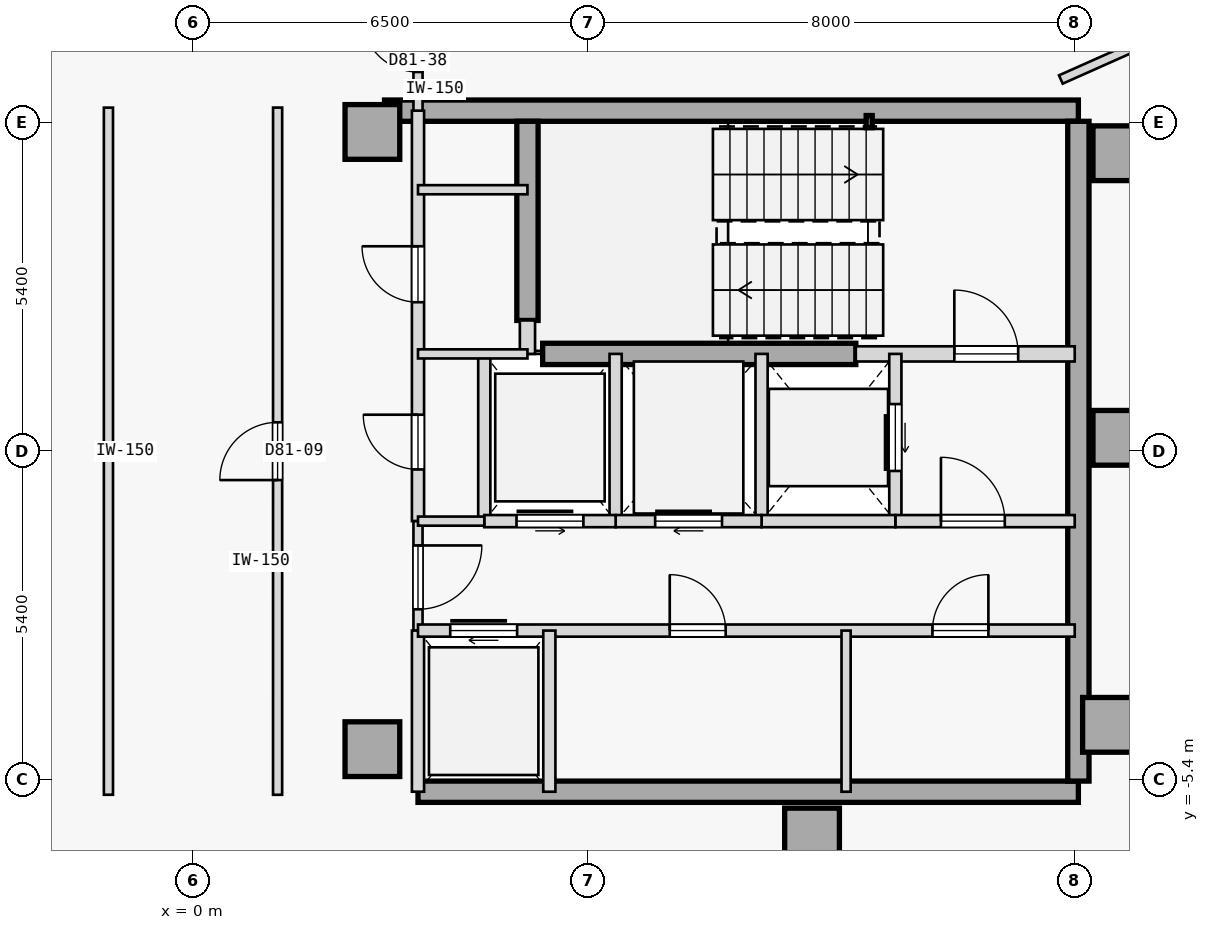
"""IFC4 building model, lengths in metres.
Left out: names, types, materials, properties, quantities, classifications, styles, units other than length and angle.
Written with IfcOpenShell. Run it as: python <this file> out.ifc"""

import sys

from ifc_helpers import new_model, si_unit, direction, frame, frame_2d, origin, origin_2d, place, context, subcontext, project, spatial, rectangle, hollow_rectangle, extrude, element, fill, save


model = new_model("IFC4")
c1 = context("Model", 3, precision=1e-05, world=origin(), true_north=direction((0.0, 1.0)))
c2 = subcontext(c1, "Body", "Model", "MODEL_VIEW")
j1 = project(units=[si_unit("LENGTHUNIT", "METRE"), si_unit("PLANEANGLEUNIT", "RADIAN")], contexts=[c1])
p1 = place(None, origin())
s1 = spatial("IfcSite", under=j1, at=p1, CompositionType="ELEMENT")
p2 = place(p1, origin())
s2 = spatial("IfcBuilding", under=s1, at=p2, CompositionType="ELEMENT")
p3 = place(p2, frame((0.0, 0.0, 302.0)))
s3 = spatial("IfcBuildingStorey", under=s2, at=p3, CompositionType="ELEMENT", Elevation=302.0)
for number, where, z_axis, x_axis in (
    (1, (15.25, 4.9, 0.0), (0.0, 0.0, 1.0), (1.0, 0.0, 0.0)),
    (2, (15.25, 0.22, 0.0), (0.0, 0.0, 1.0), (1.0, 0.0, 0.0)),
    (3, (15.08, -4.5, 0.0), (0.0, 0.0, 1.0), (1.0, 0.0, 0.0)),
    (4, (10.18, -6.32, 0.0), (0.0, 0.0, 1.0), (1.0, 0.0, 0.0)),
    (5, (2.95, -4.9, 0.0), (0.0, 0.0, 1.0), (1.0, 0.0, 0.0)),
    (6, (2.95, 5.25, 0.0), (0.0, 0.0, 1.0), (1.0, 0.0, 0.0)),
):
    element("IfcColumn", number, at=place(p3, frame(where, z_axis=z_axis, x_axis=x_axis)), inside=s3, PredefinedType="COLUMN", context=c2, shape_type="SweptSolid", body=[
        extrude(rectangle(XDim=0.9, YDim=0.9, at=origin_2d()), origin(), (0.0, 0.0, 1.0), 3.55),
    ])
p4 = place(p3, frame((3.15, 5.6, 0.0), z_axis=(0.0, 0.0, 1.0), x_axis=(1.0, 0.0, 0.0)))
e7 = element("IfcWall", 7, at=p4, inside=s3, PredefinedType="SHEAR", context=c2, shape_type="SweptSolid", body=[
    extrude(rectangle(XDim=11.41, YDim=0.35, at=frame_2d((5.705, 0.0))), origin(), (0.0, 0.0, 1.0), 3.145),
])
p5 = place(p3, frame((3.7, -5.6, 0.0), z_axis=(0.0, 0.0, 1.0), x_axis=(1.0, 0.0, 0.0)))
e8 = element("IfcWall", 8, at=p5, inside=s3, PredefinedType="SHEAR", context=c2, shape_type="SweptSolid", body=[
    extrude(rectangle(XDim=10.86, YDim=0.35, at=frame_2d((5.43, 0.0))), origin(), (0.0, 0.0, 1.0), 3.145),
])
p6 = place(p3, frame((14.56, -5.425, 0.0), z_axis=(0.0, 0.0, 1.0), x_axis=(0.0, 1.0, 0.0)))
e9 = element("IfcWall", 9, at=p6, inside=s3, PredefinedType="SHEAR", context=c2, shape_type="SweptSolid", body=[
    extrude(rectangle(XDim=10.85, YDim=0.35, at=frame_2d((5.425, 0.0))), origin(), (0.0, 0.0, 1.0), 3.145),
])
p7 = place(p3, frame((5.5, 2.15, 0.0), z_axis=(0.0, 0.0, 1.0), x_axis=(0.0, 1.0, 0.0)))
e10 = element("IfcWall", 10, at=p7, inside=s3, PredefinedType="SHEAR", context=c2, shape_type="SweptSolid", body=[
    extrude(rectangle(XDim=3.275, YDim=0.35, at=frame_2d((1.638, 0.0))), origin(), (0.0, 0.0, 1.0), 3.145),
])
p8 = place(p3, frame((5.75, 1.6, 0.0), z_axis=(0.0, 0.0, 1.0), x_axis=(1.0, 0.0, 0.0)))
e11 = element("IfcWall", 11, at=p8, inside=s3, PredefinedType="SHEAR", context=c2, shape_type="SweptSolid", body=[
    extrude(rectangle(XDim=5.15, YDim=0.35, at=frame_2d((2.575, 0.0))), origin(), (0.0, 0.0, 1.0), 3.145),
])
p9 = place(p3, frame((11.12, 5.42, 0.0), z_axis=(0.0, 0.0, 1.0), x_axis=(1.0, 0.0, 0.0)))
e12 = element("IfcColumn", 12, at=p9, inside=s3, PredefinedType="COLUMN", context=c2, shape_type="SweptSolid", body=[
    extrude(hollow_rectangle(XDim=0.1, YDim=0.2, WallThickness=0.008, at=origin_2d()), origin(), (0.0, 0.0, 1.0), 3.55),
])
p10 = place(p3, frame((10.9, 1.6, 0.0), z_axis=(0.0, 0.0, 1.0), x_axis=(1.0, 0.0, 0.0)))
e13 = element("IfcWall", 13, at=p10, inside=s3, PredefinedType="STANDARD", context=c2, shape_type="SweptSolid", body=[
    extrude(rectangle(XDim=3.6, YDim=0.25, at=frame_2d((1.8, 0.0))), origin(), (0.0, 0.0, 1.0), 3.145),
])
p11 = place(p10, frame((1.62, 0.0, 0.0)))
e14 = element("IfcOpeningElement", 14, at=p11, cuts=e13, PredefinedType="OPENING", context=c2, shape_type="SweptSolid", body=[
    extrude(rectangle(XDim=1.05, YDim=2.15, at=frame_2d((0.525, 1.075))), frame((0.0, 0.135, 0.0), z_axis=(0.0, -1.0, 0.0), x_axis=(1.0, 0.0, 0.0)), (0.0, 0.0, 1.0), 0.27),
])
p12 = place(p3, frame((5.5, 1.6, 0.0), z_axis=(0.0, 0.0, 1.0), x_axis=(0.0, 1.0, 0.0)))
e15 = element("IfcWall", 15, at=p12, inside=s3, PredefinedType="STANDARD", context=c2, shape_type="SweptSolid", body=[
    extrude(rectangle(XDim=0.55, YDim=0.25, at=frame_2d((0.275, 0.0))), origin(), (0.0, 0.0, 1.0), 3.145),
])
p13 = place(p3, frame((3.7, -1.15, 0.0), z_axis=(0.0, 0.0, 1.0), x_axis=(0.0, 1.0, 0.0)))
e16 = element("IfcWall", 16, at=p13, inside=s3, PredefinedType="STANDARD", context=c2, shape_type="SweptSolid", body=[
    extrude(rectangle(XDim=6.75, YDim=0.2, at=frame_2d((3.375, 0.0))), origin(), (0.0, 0.0, 1.0), 3.145),
])
p14 = place(p13, frame((3.6, 0.0, 0.0)))
e17 = element("IfcOpeningElement", 17, at=p14, cuts=e16, PredefinedType="OPENING", context=c2, shape_type="SweptSolid", body=[
    extrude(rectangle(XDim=0.92, YDim=2.04, at=frame_2d((0.46, 1.02))), frame((0.0, 0.11, 0.0), z_axis=(0.0, -1.0, 0.0), x_axis=(1.0, 0.0, 0.0)), (0.0, 0.0, 1.0), 0.22),
])
p15 = place(p13, frame((0.85, 0.0, 0.0)))
e18 = element("IfcOpeningElement", 18, at=p15, cuts=e16, PredefinedType="OPENING", context=c2, shape_type="SweptSolid", body=[
    extrude(rectangle(XDim=0.9, YDim=2.04, at=frame_2d((0.45, 1.02))), frame((0.0, 0.11, 0.0), z_axis=(0.0, -1.0, 0.0), x_axis=(1.0, 0.0, 0.0)), (0.0, 0.0, 1.0), 0.22),
])
p16 = place(p3, frame((3.7, -2.95, 0.0), z_axis=(0.0, 0.0, 1.0), x_axis=(0.0, 1.0, 0.0)))
e19 = element("IfcWall", 19, at=p16, inside=s3, PredefinedType="PARTITIONING", context=c2, shape_type="SweptSolid", body=[
    extrude(rectangle(XDim=1.8, YDim=0.15, at=frame_2d((0.9, 0.0))), origin(), (0.0, 0.0, 1.0), 3.145),
])
p17 = place(p16, frame((0.35, 0.0, 0.0)))
e20 = element("IfcOpeningElement", 20, at=p17, cuts=e19, PredefinedType="OPENING", context=c2, shape_type="SweptSolid", body=[
    extrude(rectangle(XDim=1.05, YDim=2.18, at=frame_2d((0.525, 1.09))), frame((0.0, 0.085, 0.0), z_axis=(0.0, -1.0, 0.0), x_axis=(1.0, 0.0, 0.0)), (0.0, 0.0, 1.0), 0.17),
])
p18 = place(p3, frame((3.7, -5.6, 0.0), z_axis=(0.0, 0.0, 1.0), x_axis=(0.0, 1.0, 0.0)))
e21 = element("IfcWall", 21, at=p18, inside=s3, PredefinedType="STANDARD", context=c2, shape_type="SweptSolid", body=[
    extrude(rectangle(XDim=2.65, YDim=0.2, at=frame_2d((1.325, 0.0))), origin(), (0.0, 0.0, 1.0), 3.145),
])
p19 = place(p3, frame((11.55, -1.15, 0.0), z_axis=(0.0, 0.0, 1.0), x_axis=(0.0, 1.0, 0.0)))
e22 = element("IfcWall", 22, at=p19, inside=s3, PredefinedType="STANDARD", context=c2, shape_type="SweptSolid", body=[
    extrude(rectangle(XDim=2.75, YDim=0.2, at=frame_2d((1.375, 0.0))), origin(), (0.0, 0.0, 1.0), 3.145),
])
p20 = place(p19, frame((0.825, 0.0, 0.0)))
e23 = element("IfcOpeningElement", 23, at=p20, cuts=e22, PredefinedType="OPENING", context=c2, shape_type="SweptSolid", body=[
    extrude(rectangle(XDim=1.1, YDim=2.15, at=frame_2d((0.55, 1.075))), frame((0.0, 0.11, 0.0), z_axis=(0.0, -1.0, 0.0), x_axis=(1.0, 0.0, 0.0)), (0.0, 0.0, 1.0), 0.22),
])
p21 = place(p3, frame((9.35, -1.15, 0.0), z_axis=(0.0, 0.0, 1.0), x_axis=(0.0, 1.0, 0.0)))
e24 = element("IfcWall", 24, at=p21, inside=s3, PredefinedType="STANDARD", context=c2, shape_type="SweptSolid", body=[
    extrude(rectangle(XDim=2.75, YDim=0.2, at=frame_2d((1.375, 0.0))), origin(), (0.0, 0.0, 1.0), 3.145),
])
p22 = place(p3, frame((11.55, -1.15, 0.0), z_axis=(0.0, 0.0, 1.0), x_axis=(1.0, 0.0, 0.0)))
e25 = element("IfcWall", 25, at=p22, inside=s3, PredefinedType="STANDARD", context=c2, shape_type="SweptSolid", body=[
    extrude(rectangle(XDim=2.95, YDim=0.2, at=frame_2d((1.475, 0.0))), origin(), (0.0, 0.0, 1.0), 3.145),
])
p23 = place(p22, frame((0.75, 0.0, 0.0)))
e26 = element("IfcOpeningElement", 26, at=p23, cuts=e25, PredefinedType="OPENING", context=c2, shape_type="SweptSolid", body=[
    extrude(rectangle(XDim=1.05, YDim=2.18, at=frame_2d((0.525, 1.09))), frame((0.0, 0.11, 0.0), z_axis=(0.0, -1.0, 0.0), x_axis=(1.0, 0.0, 0.0)), (0.0, 0.0, 1.0), 0.22),
])
p24 = place(p3, frame((9.35, -1.15, 0.0), z_axis=(0.0, 0.0, 1.0), x_axis=(1.0, 0.0, 0.0)))
e27 = element("IfcWall", 27, at=p24, inside=s3, PredefinedType="STANDARD", context=c2, shape_type="SweptSolid", body=[
    extrude(rectangle(XDim=2.2, YDim=0.2, at=frame_2d((1.1, 0.0))), origin(), (0.0, 0.0, 1.0), 3.145),
])
p25 = place(p3, frame((6.95, -1.15, 0.0), z_axis=(0.0, 0.0, 1.0), x_axis=(0.0, 1.0, 0.0)))
e28 = element("IfcWall", 28, at=p25, inside=s3, PredefinedType="STANDARD", context=c2, shape_type="SweptSolid", body=[
    extrude(rectangle(XDim=2.75, YDim=0.2, at=frame_2d((1.375, 0.0))), origin(), (0.0, 0.0, 1.0), 3.145),
])
p26 = place(p3, frame((6.95, -1.15, 0.0), z_axis=(0.0, 0.0, 1.0), x_axis=(1.0, 0.0, 0.0)))
e29 = element("IfcWall", 29, at=p26, inside=s3, PredefinedType="STANDARD", context=c2, shape_type="SweptSolid", body=[
    extrude(rectangle(XDim=2.4, YDim=0.2, at=frame_2d((1.2, 0.0))), origin(), (0.0, 0.0, 1.0), 3.145),
])
p27 = place(p26, frame((0.65, 0.0, 0.0)))
e30 = element("IfcOpeningElement", 30, at=p27, cuts=e29, PredefinedType="OPENING", context=c2, shape_type="SweptSolid", body=[
    extrude(rectangle(XDim=1.1, YDim=2.15, at=frame_2d((0.55, 1.075))), frame((0.0, 0.11, 0.0), z_axis=(0.0, -1.0, 0.0), x_axis=(1.0, 0.0, 0.0)), (0.0, 0.0, 1.0), 0.22),
])
p28 = place(p3, frame((4.79, -1.15, 0.0), z_axis=(0.0, 0.0, 1.0), x_axis=(0.0, 1.0, 0.0)))
e31 = element("IfcWall", 31, at=p28, inside=s3, PredefinedType="STANDARD", context=c2, shape_type="SweptSolid", body=[
    extrude(rectangle(XDim=2.75, YDim=0.2, at=frame_2d((1.375, 0.0))), origin(), (0.0, 0.0, 1.0), 3.145),
])
p29 = place(p3, frame((4.79, -1.15, 0.0), z_axis=(0.0, 0.0, 1.0), x_axis=(1.0, 0.0, 0.0)))
e32 = element("IfcWall", 32, at=p29, inside=s3, PredefinedType="STANDARD", context=c2, shape_type="SweptSolid", body=[
    extrude(rectangle(XDim=2.16, YDim=0.2, at=frame_2d((1.08, 0.0))), origin(), (0.0, 0.0, 1.0), 3.145),
])
p30 = place(p29, frame((0.53, 0.0, 0.0)))
e33 = element("IfcOpeningElement", 33, at=p30, cuts=e32, PredefinedType="OPENING", context=c2, shape_type="SweptSolid", body=[
    extrude(rectangle(XDim=1.1, YDim=2.15, at=frame_2d((0.55, 1.075))), frame((0.0, 0.11, 0.0), z_axis=(0.0, -1.0, 0.0), x_axis=(1.0, 0.0, 0.0)), (0.0, 0.0, 1.0), 0.22),
])
p31 = place(p3, frame((3.7, -1.15, 0.0), z_axis=(0.0, 0.0, 1.0), x_axis=(1.0, 0.0, 0.0)))
e34 = element("IfcWall", 34, at=p31, inside=s3, PredefinedType="PARTITIONING", context=c2, shape_type="SweptSolid", body=[
    extrude(rectangle(XDim=1.09, YDim=0.15, at=frame_2d((0.545, 0.0))), origin(), (0.0, 0.0, 1.0), 3.145),
])
p32 = place(p3, frame((3.7, -2.95, 0.0), z_axis=(0.0, 0.0, 1.0), x_axis=(1.0, 0.0, 0.0)))
e35 = element("IfcWall", 35, at=p32, inside=s3, PredefinedType="STANDARD", context=c2, shape_type="SweptSolid", body=[
    extrude(rectangle(XDim=10.8, YDim=0.2, at=frame_2d((5.4, 0.0))), origin(), (0.0, 0.0, 1.0), 3.145),
])
p33 = place(p32, frame((0.53, 0.0, 0.0)))
e36 = element("IfcOpeningElement", 36, at=p33, cuts=e35, PredefinedType="OPENING", context=c2, shape_type="SweptSolid", body=[
    extrude(rectangle(XDim=1.1, YDim=2.15, at=frame_2d((0.55, 1.075))), frame((0.0, 0.11, 0.0), z_axis=(0.0, -1.0, 0.0), x_axis=(1.0, 0.0, 0.0)), (0.0, 0.0, 1.0), 0.22),
])
p34 = place(p32, frame((4.14, 0.0, 0.0)))
e37 = element("IfcOpeningElement", 37, at=p34, cuts=e35, PredefinedType="OPENING", context=c2, shape_type="SweptSolid", body=[
    extrude(rectangle(XDim=0.92, YDim=2.04, at=frame_2d((0.46, 1.02))), frame((0.0, 0.11, 0.0), z_axis=(0.0, -1.0, 0.0), x_axis=(1.0, 0.0, 0.0)), (0.0, 0.0, 1.0), 0.22),
])
p35 = place(p32, frame((8.46, 0.0, 0.0)))
e38 = element("IfcOpeningElement", 38, at=p35, cuts=e35, PredefinedType="OPENING", context=c2, shape_type="SweptSolid", body=[
    extrude(rectangle(XDim=0.92, YDim=2.04, at=frame_2d((0.46, 1.02))), frame((0.0, 0.11, 0.0), z_axis=(0.0, -1.0, 0.0), x_axis=(1.0, 0.0, 0.0)), (0.0, 0.0, 1.0), 0.22),
])
p36 = place(p3, frame((5.86, -5.6, 0.0), z_axis=(0.0, 0.0, 1.0), x_axis=(0.0, 1.0, 0.0)))
e39 = element("IfcWall", 39, at=p36, inside=s3, PredefinedType="STANDARD", context=c2, shape_type="SweptSolid", body=[
    extrude(rectangle(XDim=2.65, YDim=0.2, at=frame_2d((1.325, 0.0))), origin(), (0.0, 0.0, 1.0), 3.145),
])
p37 = place(p3, frame((10.74, -5.6, 0.0), z_axis=(0.0, 0.0, 1.0), x_axis=(0.0, 1.0, 0.0)))
e40 = element("IfcWall", 40, at=p37, inside=s3, PredefinedType="PARTITIONING", context=c2, shape_type="SweptSolid", body=[
    extrude(rectangle(XDim=2.65, YDim=0.15, at=frame_2d((1.325, 0.0))), origin(), (0.0, 0.0, 1.0), 3.145),
])
for number, where, z_axis, x_axis in (
    (41, (3.7, 4.3, 0.0), (0.0, 0.0, 1.0), (1.0, 0.0, 0.0)),
    (42, (3.7, 1.6, 0.0), (0.0, 0.0, 1.0), (1.0, 0.0, 0.0)),
):
    element("IfcWall", number, at=place(p3, frame(where, z_axis=z_axis, x_axis=x_axis)), inside=s3, PredefinedType="PARTITIONING", context=c2, shape_type="SweptSolid", body=[
        extrude(rectangle(XDim=1.8, YDim=0.15, at=frame_2d((0.9, 0.0))), origin(), (0.0, 0.0, 1.0), 3.145),
    ])
p38 = place(p3, frame((-1.391, -5.65, 0.0), z_axis=(0.0, 0.0, 1.0), x_axis=(-2.1605738e-05, 0.999999999767, 0.0)))
e43 = element("IfcWall", 43, at=p38, inside=s3, PredefinedType="PARTITIONING", context=c2, shape_type="SweptSolid", body=[
    extrude(rectangle(XDim=11.3, YDim=0.15, at=frame_2d((5.65, 0.0))), origin(), (0.0, 0.0, 1.0), 3.145),
])
p39 = place(p3, frame((1.391, -5.65, 0.0), z_axis=(0.0, 0.0, 1.0), x_axis=(4.3206809e-05, 0.999999999067, 0.0)))
e44 = element("IfcWall", 44, at=p39, inside=s3, PredefinedType="PARTITIONING", context=c2, shape_type="SweptSolid", body=[
    extrude(rectangle(XDim=11.301, YDim=0.15, at=frame_2d((5.65, 0.0))), origin(), (0.0, 0.0, 1.0), 3.145),
])
p40 = place(p39, frame((5.176, 0.0, 0.0)))
e45 = element("IfcOpeningElement", 45, at=p40, cuts=e44, PredefinedType="OPENING", context=c2, shape_type="SweptSolid", body=[
    extrude(rectangle(XDim=0.95, YDim=2.04, at=frame_2d((0.475, 1.02))), frame((0.0, 0.085, 0.0), z_axis=(0.0, -1.0, 0.0), x_axis=(1.0, 0.0, 0.0)), (0.0, 0.0, 1.0), 0.17),
])
p41 = place(p3, frame((14.844, -7.22, 0.0), z_axis=(0.0, 0.0, 1.0), x_axis=(0.913524337797, 0.406784075711, 0.0)))
e46 = element("IfcWall", 46, at=p41, inside=s3, PredefinedType="PARTITIONING", context=c2, shape_type="SweptSolid", body=[
    extrude(rectangle(XDim=4.35, YDim=0.15, at=frame_2d((2.175, 0.0))), origin(), (0.0, 0.0, 1.0), 3.145),
])
p42 = place(p3, frame((3.7, 5.601, 0.0), z_axis=(0.0, 0.0, 1.0), x_axis=(0.0, 1.0, 0.0)))
e47 = element("IfcWall", 47, at=p42, inside=s3, PredefinedType="PARTITIONING", context=c2, shape_type="SweptSolid", body=[
    extrude(rectangle(XDim=1.775, YDim=0.15, at=frame_2d((0.888, 0.0))), origin(), (0.0, 0.0, 1.0), 3.145),
])
p43 = place(p42, frame((0.635, 0.0, 0.0)))
e48 = element("IfcOpeningElement", 48, at=p43, cuts=e47, PredefinedType="OPENING", context=c2, shape_type="SweptSolid", body=[
    extrude(rectangle(XDim=0.92, YDim=2.04, at=frame_2d((0.46, 1.02))), frame((0.0, 0.085, 0.0), z_axis=(0.0, -1.0, 0.0), x_axis=(1.0, 0.0, 0.0)), (0.0, 0.0, 1.0), 0.17),
])
p44 = place(p3, frame((14.272, 6.113, 0.0), z_axis=(0.0, 0.0, 1.0), x_axis=(0.913551014388, 0.406724162191, 0.0)))
e49 = element("IfcWall", 49, at=p44, inside=s3, PredefinedType="PARTITIONING", context=c2, shape_type="SweptSolid", body=[
    extrude(rectangle(XDim=14.192, YDim=0.15, at=frame_2d((7.096, 0.0))), origin(), (0.0, 0.0, 1.0), 3.145),
])
p45 = place(p44, frame((6.636, 0.0, 0.0)))
e50 = element("IfcOpeningElement", 50, at=p45, cuts=e49, PredefinedType="OPENING", context=c2, shape_type="SweptSolid", body=[
    extrude(rectangle(XDim=0.92, YDim=2.04, at=frame_2d((0.46, 1.02))), frame((0.0, 0.085, 0.0), z_axis=(0.0, -1.0, 0.0), x_axis=(1.0, 0.0, 0.0)), (0.0, 0.0, 1.0), 0.17),
])
p46 = place(p11, origin())
e51 = element("IfcDoor", 51, at=p46, inside=s3, OperationType="SINGLE_SWING_LEFT", PredefinedType="DOOR", context=c2, shape_type="SweptSolid", body=[
    extrude(rectangle(XDim=1.05, YDim=2.15, at=frame_2d((0.525, 1.075))), frame((0.0, 0.025, 0.0), z_axis=(0.0, -1.0, 0.0), x_axis=(1.0, 0.0, 0.0)), (0.0, 0.0, 1.0), 0.05),
])
fill(e14, e51)
p47 = place(p23, origin())
e52 = element("IfcDoor", 52, at=p47, inside=s3, OperationType="SINGLE_SWING_LEFT", PredefinedType="DOOR", context=c2, shape_type="SweptSolid", body=[
    extrude(rectangle(XDim=1.05, YDim=2.18, at=frame_2d((0.525, 1.09))), frame((0.0, 0.025, 0.0), z_axis=(0.0, -1.0, 0.0), x_axis=(1.0, 0.0, 0.0)), (0.0, 0.0, 1.0), 0.05),
])
fill(e26, e52)
p48 = place(p17, frame((1.05, 0.0, 0.0), z_axis=(0.0, 0.0, 1.0), x_axis=(-1.0, 0.0, 0.0)))
e53 = element("IfcDoor", 53, at=p48, inside=s3, OperationType="SINGLE_SWING_RIGHT", PredefinedType="DOOR", context=c2, shape_type="SweptSolid", body=[
    extrude(rectangle(XDim=1.05, YDim=2.18, at=frame_2d((0.525, 1.09))), frame((0.0, 0.025, 0.0), z_axis=(0.0, -1.0, 0.0), x_axis=(1.0, 0.0, 0.0)), (0.0, 0.0, 1.0), 0.05),
])
fill(e20, e53)
p49 = place(p20, origin())
e54 = element("IfcDoor", 54, at=p49, inside=s3, OperationType="SLIDING_TO_RIGHT", PredefinedType="DOOR", context=c2, shape_type="SweptSolid", body=[
    extrude(rectangle(XDim=1.1, YDim=2.15, at=frame_2d((0.55, 1.075))), frame((0.0, 0.025, 0.0), z_axis=(0.0, -1.0, 0.0), x_axis=(1.0, 0.0, 0.0)), (0.0, 0.0, 1.0), 0.05),
])
fill(e23, e54)
p50 = place(p27, origin())
e55 = element("IfcDoor", 55, at=p50, inside=s3, OperationType="SLIDING_TO_RIGHT", PredefinedType="DOOR", context=c2, shape_type="SweptSolid", body=[
    extrude(rectangle(XDim=1.1, YDim=2.15, at=frame_2d((0.55, 1.075))), frame((0.0, 0.025, 0.0), z_axis=(0.0, -1.0, 0.0), x_axis=(1.0, 0.0, 0.0)), (0.0, 0.0, 1.0), 0.05),
])
fill(e30, e55)
p51 = place(p30, origin())
e56 = element("IfcDoor", 56, at=p51, inside=s3, OperationType="SLIDING_TO_LEFT", PredefinedType="DOOR", context=c2, shape_type="SweptSolid", body=[
    extrude(rectangle(XDim=1.1, YDim=2.15, at=frame_2d((0.55, 1.075))), frame((0.0, 0.025, 0.0), z_axis=(0.0, -1.0, 0.0), x_axis=(1.0, 0.0, 0.0)), (0.0, 0.0, 1.0), 0.05),
])
fill(e33, e56)
p52 = place(p33, origin())
e57 = element("IfcDoor", 57, at=p52, inside=s3, OperationType="SLIDING_TO_RIGHT", PredefinedType="DOOR", context=c2, shape_type="SweptSolid", body=[
    extrude(rectangle(XDim=1.1, YDim=2.15, at=frame_2d((0.55, 1.075))), frame((0.0, 0.025, 0.0), z_axis=(0.0, -1.0, 0.0), x_axis=(1.0, 0.0, 0.0)), (0.0, 0.0, 1.0), 0.05),
])
fill(e36, e57)
p53 = place(p34, origin())
e58 = element("IfcDoor", 58, at=p53, inside=s3, OperationType="SINGLE_SWING_LEFT", PredefinedType="DOOR", context=c2, shape_type="SweptSolid", body=[
    extrude(rectangle(XDim=0.92, YDim=2.04, at=frame_2d((0.46, 1.02))), frame((0.0, 0.025, 0.0), z_axis=(0.0, -1.0, 0.0), x_axis=(1.0, 0.0, 0.0)), (0.0, 0.0, 1.0), 0.05),
])
fill(e37, e58)
p54 = place(p35, origin())
e59 = element("IfcDoor", 59, at=p54, inside=s3, OperationType="SINGLE_SWING_RIGHT", PredefinedType="DOOR", context=c2, shape_type="SweptSolid", body=[
    extrude(rectangle(XDim=0.92, YDim=2.04, at=frame_2d((0.46, 1.02))), frame((0.0, 0.025, 0.0), z_axis=(0.0, -1.0, 0.0), x_axis=(1.0, 0.0, 0.0)), (0.0, 0.0, 1.0), 0.05),
])
fill(e38, e59)
p55 = place(p14, origin())
e60 = element("IfcDoor", 60, at=p55, inside=s3, OperationType="SINGLE_SWING_RIGHT", PredefinedType="DOOR", context=c2, shape_type="SweptSolid", body=[
    extrude(rectangle(XDim=0.92, YDim=2.04, at=frame_2d((0.46, 1.02))), frame((0.0, 0.025, 0.0), z_axis=(0.0, -1.0, 0.0), x_axis=(1.0, 0.0, 0.0)), (0.0, 0.0, 1.0), 0.05),
])
fill(e17, e60)
p56 = place(p15, origin())
e61 = element("IfcDoor", 61, at=p56, inside=s3, OperationType="SINGLE_SWING_RIGHT", PredefinedType="DOOR", context=c2, shape_type="SweptSolid", body=[
    extrude(rectangle(XDim=0.9, YDim=2.04, at=frame_2d((0.45, 1.02))), frame((0.0, 0.025, 0.0), z_axis=(0.0, -1.0, 0.0), x_axis=(1.0, 0.0, 0.0)), (0.0, 0.0, 1.0), 0.05),
])
fill(e18, e61)
p57 = place(p40, origin())
e62 = element("IfcDoor", 62, at=p57, inside=s3, OperationType="SINGLE_SWING_LEFT", PredefinedType="DOOR", context=c2, shape_type="SweptSolid", body=[
    extrude(rectangle(XDim=0.95, YDim=2.04, at=frame_2d((0.475, 1.02))), frame((0.0, 0.025, 0.0), z_axis=(0.0, -1.0, 0.0), x_axis=(1.0, 0.0, 0.0)), (0.0, 0.0, 1.0), 0.05),
])
fill(e45, e62)
p58 = place(p43, origin())
e63 = element("IfcDoor", 63, at=p58, inside=s3, OperationType="SINGLE_SWING_RIGHT", PredefinedType="DOOR", context=c2, shape_type="SweptSolid", body=[
    extrude(rectangle(XDim=0.92, YDim=2.04, at=frame_2d((0.46, 1.02))), frame((0.0, 0.025, 0.0), z_axis=(0.0, -1.0, 0.0), x_axis=(1.0, 0.0, 0.0)), (0.0, 0.0, 1.0), 0.05),
])
fill(e48, e63)
save(model, sys.argv[1])
